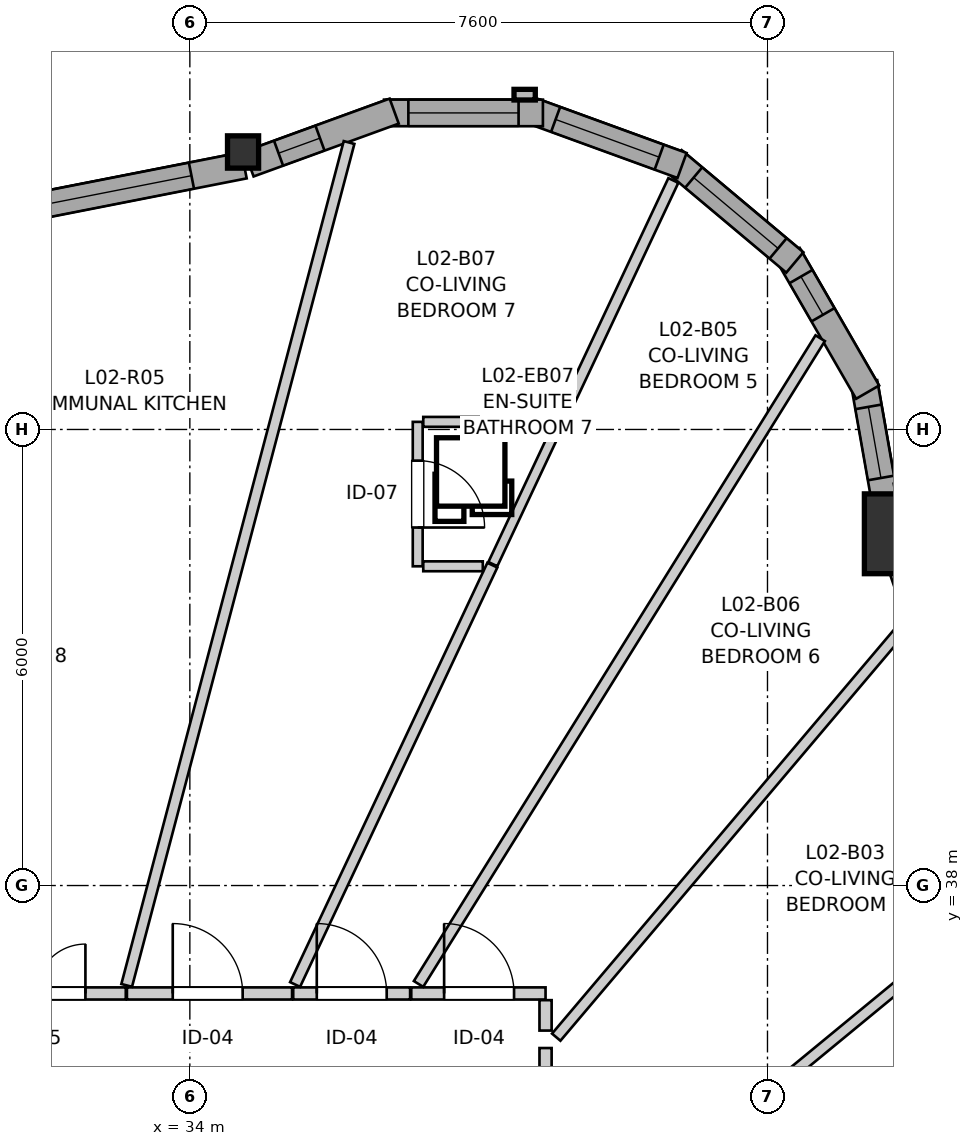
"""IFC4 building model, lengths in metres.
Left out: names, types, materials, properties, quantities, classifications, styles, units other than length and angle.
Written with IfcOpenShell. Run it as: python <this file> out.ifc"""

import sys

from ifc_helpers import new_model, si_unit, direction, frame, frame_2d, origin, origin_2d, place, context, subcontext, project, spatial, rectangle, i_section, extrude, source, transform, mapped, element, fill, save


model = new_model("IFC4")
c1 = context("Model", 3, precision=1e-05, world=origin(), true_north=direction((0.0, 1.0)))
c2 = subcontext(c1, "Body", "Model", "MODEL_VIEW")
j1 = project(units=[si_unit("LENGTHUNIT", "METRE"), si_unit("PLANEANGLEUNIT", "RADIAN")], contexts=[c1])
p1 = place(None, origin())
s1 = spatial("IfcSite", under=j1, at=p1, CompositionType="ELEMENT")
p2 = place(p1, origin())
s2 = spatial("IfcBuilding", under=s1, at=p2, CompositionType="ELEMENT")
p3 = place(p2, frame((0.0, 0.0, 11.0)))
s3 = spatial("IfcBuildingStorey", under=s2, at=p3, CompositionType="ELEMENT", Elevation=11.0)
m1 = source(origin(), c2, "Body", "SweptSolid", [
    extrude(rectangle(XDim=1.05, YDim=1.05, at=origin_2d()), origin(), (0.0, 0.0, 1.0), 2.94),
])
p4 = place(p3, frame((43.4, 42.628, 0.0), z_axis=(0.0, 0.0, 1.0), x_axis=(1.0, 0.0, 0.0)))
e1 = element("IfcColumn", 1, at=p4, inside=s3, PredefinedType="COLUMN", context=c2, shape_type="MappedRepresentation", body=[
    mapped(m1, transform((0.0, 0.0, 0.0), x_axis=(1.0, 0.0, 0.0), y_axis=(0.0, 1.0, 0.0), z_axis=(0.0, 0.0, 1.0), scale=1.0)),
])
m2 = source(origin(), c2, "Body", "SweptSolid", [
    extrude(i_section(OverallWidth=0.409, OverallDepth=0.425, WebThickness=0.03, FlangeThickness=0.048, FilletRadius=0.015, at=origin_2d()), origin(), (0.0, 0.0, 1.0), 2.94),
])
p5 = place(p3, frame((34.7, 47.651, 0.0), z_axis=(0.0, 0.0, 1.0), x_axis=(1.0, 0.0, 0.0)))
e2 = element("IfcColumn", 2, at=p5, inside=s3, PredefinedType="PILASTER", context=c2, shape_type="MappedRepresentation", body=[
    mapped(m2, transform((0.0, 0.0, 0.0), x_axis=(1.0, 0.0, 0.0), y_axis=(0.0, 1.0, 0.0), z_axis=(0.0, 0.0, 1.0), scale=1.0)),
])
p6 = place(p3, frame((44.384, 39.21, 0.0), z_axis=(0.0, 0.0, 1.0), x_axis=(-0.323604561993, 0.946192415663, 0.0)))
e3 = element("IfcWall", 3, at=p6, inside=s3, PredefinedType="SOLIDWALL", context=c2, shape_type="SweptSolid", body=[
    extrude(rectangle(XDim=3.252, YDim=0.35, at=frame_2d((1.626, 0.0))), origin(), (0.0, 0.0, 1.0), 2.42),
])
p7 = place(p6, frame((0.683, 0.0, 0.82)))
e4 = element("IfcOpeningElement", 4, at=p7, cuts=e3, PredefinedType="OPENING", context=c2, shape_type="SweptSolid", body=[
    extrude(rectangle(XDim=1.15, YDim=1.2, at=frame_2d((0.575, 0.6))), frame((0.0, 0.185, 0.0), z_axis=(0.0, -1.0, 0.0), x_axis=(1.0, 0.0, 0.0)), (0.0, 0.0, 1.0), 0.37),
])
p8 = place(p3, frame((43.176, 42.893, 0.0), z_axis=(0.0, 0.0, 1.0), x_axis=(-0.173610462023, 0.984814402553, 0.0)))
e5 = element("IfcWall", 5, at=p8, inside=s3, PredefinedType="SOLIDWALL", context=c2, shape_type="SweptSolid", body=[
    extrude(rectangle(XDim=1.752, YDim=0.35, at=frame_2d((0.876, 0.0))), origin(), (0.0, 0.0, 1.0), 2.42),
])
p9 = place(p8, frame((0.476, 0.0, 0.82)))
e6 = element("IfcOpeningElement", 6, at=p9, cuts=e5, PredefinedType="OPENING", context=c2, shape_type="SweptSolid", body=[
    extrude(rectangle(XDim=0.95, YDim=1.35, at=frame_2d((0.475, 0.675))), frame((0.0, 0.185, 0.0), z_axis=(0.0, -1.0, 0.0), x_axis=(1.0, 0.0, 0.0)), (0.0, 0.0, 1.0), 0.37),
])
p10 = place(p3, frame((42.917, 44.491, 0.0), z_axis=(0.0, 0.0, 1.0), x_axis=(-0.49990781971, 0.866078617559, 0.0)))
e7 = element("IfcWall", 7, at=p10, inside=s3, PredefinedType="SOLIDWALL", context=c2, shape_type="SweptSolid", body=[
    extrude(rectangle(XDim=2.09, YDim=0.35, at=frame_2d((1.045, 0.0))), origin(), (0.0, 0.0, 1.0), 2.42),
])
p11 = place(p10, frame((1.175, 0.0, 0.82)))
e8 = element("IfcOpeningElement", 8, at=p11, cuts=e7, PredefinedType="OPENING", context=c2, shape_type="SweptSolid", body=[
    extrude(rectangle(XDim=0.58, YDim=1.35, at=frame_2d((0.29, 0.675))), frame((0.0, 0.185, 0.0), z_axis=(0.0, -1.0, 0.0), x_axis=(1.0, 0.0, 0.0)), (0.0, 0.0, 1.0), 0.37),
])
p12 = place(p3, frame((41.96, 46.198, 0.0), z_axis=(0.0, 0.0, 1.0), x_axis=(-0.766082082368, 0.642742750308, 0.0)))
e9 = element("IfcWall", 9, at=p12, inside=s3, PredefinedType="SOLIDWALL", context=c2, shape_type="SweptSolid", body=[
    extrude(rectangle(XDim=2.09, YDim=0.35, at=frame_2d((1.045, 0.0))), origin(), (0.0, 0.0, 1.0), 2.42),
])
p13 = place(p12, frame((0.287, 0.0, 0.82)))
e10 = element("IfcOpeningElement", 10, at=p13, cuts=e9, PredefinedType="OPENING", context=c2, shape_type="SweptSolid", body=[
    extrude(rectangle(XDim=1.45, YDim=1.25, at=frame_2d((0.725, 0.625))), frame((0.0, 0.185, 0.0), z_axis=(0.0, -1.0, 0.0), x_axis=(1.0, 0.0, 0.0)), (0.0, 0.0, 1.0), 0.37),
])
p14 = place(p3, frame((40.476, 47.473, 0.0), z_axis=(0.0, 0.0, 1.0), x_axis=(-0.939660353162, 0.342108784886, 0.0)))
e11 = element("IfcWall", 11, at=p14, inside=s3, PredefinedType="SOLIDWALL", context=c2, shape_type="SweptSolid", body=[
    extrude(rectangle(XDim=2.09, YDim=0.35, at=frame_2d((1.045, 0.0))), origin(), (0.0, 0.0, 1.0), 2.42),
])
p15 = place(p14, frame((0.32, 0.0, 0.82)))
e12 = element("IfcOpeningElement", 12, at=p15, cuts=e11, PredefinedType="OPENING", context=c2, shape_type="SweptSolid", body=[
    extrude(rectangle(XDim=1.45, YDim=1.25, at=frame_2d((0.725, 0.625))), frame((0.0, 0.185, 0.0), z_axis=(0.0, -1.0, 0.0), x_axis=(1.0, 0.0, 0.0)), (0.0, 0.0, 1.0), 0.37),
])
p16 = place(p3, frame((38.645, 48.165, 0.0), z_axis=(0.0, 0.0, 1.0), x_axis=(-1.0, 0.0, 0.0)))
e13 = element("IfcWall", 13, at=p16, inside=s3, PredefinedType="SOLIDWALL", context=c2, shape_type="SweptSolid", body=[
    extrude(rectangle(XDim=2.091, YDim=0.35, at=frame_2d((1.045, 0.0))), origin(), (0.0, 0.0, 1.0), 2.42),
])
p17 = place(p16, frame((0.32, 0.0, 0.82)))
e14 = element("IfcOpeningElement", 14, at=p17, cuts=e13, PredefinedType="OPENING", context=c2, shape_type="SweptSolid", body=[
    extrude(rectangle(XDim=1.45, YDim=1.25, at=frame_2d((0.725, 0.625))), frame((0.0, 0.185, 0.0), z_axis=(0.0, -1.0, 0.0), x_axis=(1.0, 0.0, 0.0)), (0.0, 0.0, 1.0), 0.37),
])
p18 = place(p3, frame((36.688, 48.188, 0.0), z_axis=(0.0, 0.0, 1.0), x_axis=(-0.939653047052, -0.342128851701, 0.0)))
e15 = element("IfcWall", 15, at=p18, inside=s3, PredefinedType="SOLIDWALL", context=c2, shape_type="SweptSolid", body=[
    extrude(rectangle(XDim=2.032, YDim=0.35, at=frame_2d((1.016, 0.0))), origin(), (0.0, 0.0, 1.0), 2.42),
])
p19 = place(p18, frame((1.039, 0.0, 0.82)))
e16 = element("IfcOpeningElement", 16, at=p19, cuts=e15, PredefinedType="OPENING", context=c2, shape_type="SweptSolid", body=[
    extrude(rectangle(XDim=0.58, YDim=1.35, at=frame_2d((0.29, 0.675))), frame((0.0, 0.185, 0.0), z_axis=(0.0, -1.0, 0.0), x_axis=(1.0, 0.0, 0.0)), (0.0, 0.0, 1.0), 0.37),
])
p20 = place(p3, frame((34.714, 47.475, 0.0), z_axis=(0.0, 0.0, 1.0), x_axis=(-0.981221268425, -0.192885516282, 0.0)))
e17 = element("IfcWall", 17, at=p20, inside=s3, PredefinedType="SOLIDWALL", context=c2, shape_type="SweptSolid", body=[
    extrude(rectangle(XDim=3.533, YDim=0.35, at=frame_2d((1.766, 0.0))), origin(), (0.0, 0.0, 1.0), 2.42),
])
p21 = place(p20, frame((0.706, 0.0, 0.82)))
e18 = element("IfcOpeningElement", 18, at=p21, cuts=e17, PredefinedType="OPENING", context=c2, shape_type="SweptSolid", body=[
    extrude(rectangle(XDim=2.1, YDim=1.4, at=frame_2d((1.05, 0.7))), frame((0.0, 0.185, 0.0), z_axis=(0.0, -1.0, 0.0), x_axis=(1.0, 0.0, 0.0)), (0.0, 0.0, 1.0), 0.37),
])
p22 = place(p3, frame((38.68, 35.862, 0.0), z_axis=(0.0, 0.0, 1.0), x_axis=(0.0, -1.0, 0.0)))
e19 = element("IfcWall", 19, at=p22, inside=s3, PredefinedType="PARTITIONING", context=c2, shape_type="SweptSolid", body=[
    extrude(rectangle(XDim=3.024, YDim=0.16, at=frame_2d((1.512, 0.0))), origin(), (0.0, 0.0, 1.0), 2.94),
])
p23 = place(p22, frame((1.053, 0.0, 0.0)))
e20 = element("IfcOpeningElement", 20, at=p23, cuts=e19, PredefinedType="OPENING", context=c2, shape_type="SweptSolid", body=[
    extrude(rectangle(XDim=0.92, YDim=2.1, at=frame_2d((0.46, 1.05))), frame((0.0, 0.09, 0.0), z_axis=(0.0, -1.0, 0.0), x_axis=(1.0, 0.0, 0.0)), (0.0, 0.0, 1.0), 0.18),
])
p24 = place(p3, frame((30.841, 36.58, 0.0), z_axis=(0.0, 0.0, 1.0), x_axis=(1.0, 0.0, 0.0)))
e21 = element("IfcWall", 21, at=p24, inside=s3, PredefinedType="PARTITIONING", context=c2, shape_type="SweptSolid", body=[
    extrude(rectangle(XDim=2.316, YDim=0.16, at=frame_2d((1.158, 0.0))), origin(), (0.0, 0.0, 1.0), 2.94),
])
p25 = place(p24, frame((0.485, 0.0, 0.0)))
e22 = element("IfcOpeningElement", 22, at=p25, cuts=e21, PredefinedType="OPENING", context=c2, shape_type="SweptSolid", body=[
    extrude(rectangle(XDim=1.3, YDim=2.1, at=frame_2d((0.65, 1.05))), frame((0.0, 0.09, 0.0), z_axis=(0.0, -1.0, 0.0), x_axis=(1.0, 0.0, 0.0)), (0.0, 0.0, 1.0), 0.18),
])
p26 = place(p3, frame((33.172, 36.58, 0.0), z_axis=(0.0, 0.0, 1.0), x_axis=(1.0, 0.0, 0.0)))
e23 = element("IfcWall", 23, at=p26, inside=s3, PredefinedType="PARTITIONING", context=c2, shape_type="SweptSolid", body=[
    extrude(rectangle(XDim=2.173, YDim=0.16, at=frame_2d((1.086, 0.0))), origin(), (0.0, 0.0, 1.0), 2.94),
])
p27 = place(p26, frame((0.603, 0.0, 0.0)))
e24 = element("IfcOpeningElement", 24, at=p27, cuts=e23, PredefinedType="OPENING", context=c2, shape_type="SweptSolid", body=[
    extrude(rectangle(XDim=0.92, YDim=2.1, at=frame_2d((0.46, 1.05))), frame((0.0, 0.09, 0.0), z_axis=(0.0, -1.0, 0.0), x_axis=(1.0, 0.0, 0.0)), (0.0, 0.0, 1.0), 0.18),
])
p28 = place(p3, frame((36.998, 44.1, 0.0), z_axis=(0.0, 0.0, 1.0), x_axis=(0.0, -1.0, 0.0)))
e25 = element("IfcWall", 25, at=p28, inside=s3, PredefinedType="PARTITIONING", context=c2, shape_type="SweptSolid", body=[
    extrude(rectangle(XDim=1.9, YDim=0.13, at=frame_2d((0.95, 0.0))), origin(), (0.0, 0.0, 1.0), 2.94),
])
p29 = place(p28, frame((0.51, 0.0, 0.0)))
e26 = element("IfcOpeningElement", 26, at=p29, cuts=e25, PredefinedType="OPENING", context=c2, shape_type="SweptSolid", body=[
    extrude(rectangle(XDim=0.88, YDim=2.05, at=frame_2d((0.44, 1.025))), frame((0.0, 0.075, 0.0), z_axis=(0.0, -1.0, 0.0), x_axis=(1.0, 0.0, 0.0)), (0.0, 0.0, 1.0), 0.15),
])
p30 = place(p3, frame((36.913, 36.58, 0.0), z_axis=(0.0, 0.0, 1.0), x_axis=(1.0, 0.0, 0.0)))
e27 = element("IfcWall", 27, at=p30, inside=s3, PredefinedType="PARTITIONING", context=c2, shape_type="SweptSolid", body=[
    extrude(rectangle(XDim=1.767, YDim=0.16, at=frame_2d((0.883, 0.0))), origin(), (0.0, 0.0, 1.0), 2.94),
])
p31 = place(p30, frame((0.433, 0.0, 0.0)))
e28 = element("IfcOpeningElement", 28, at=p31, cuts=e27, PredefinedType="OPENING", context=c2, shape_type="SweptSolid", body=[
    extrude(rectangle(XDim=0.92, YDim=2.1, at=frame_2d((0.46, 1.05))), frame((0.0, 0.09, 0.0), z_axis=(0.0, -1.0, 0.0), x_axis=(1.0, 0.0, 0.0)), (0.0, 0.0, 1.0), 0.18),
])
p32 = place(p3, frame((35.36, 36.58, 0.0), z_axis=(0.0, 0.0, 1.0), x_axis=(1.0, 0.0, 0.0)))
e29 = element("IfcWall", 29, at=p32, inside=s3, PredefinedType="PARTITIONING", context=c2, shape_type="SweptSolid", body=[
    extrude(rectangle(XDim=1.538, YDim=0.16, at=frame_2d((0.769, 0.0))), origin(), (0.0, 0.0, 1.0), 2.94),
])
p33 = place(p32, frame((0.31, 0.0, 0.0)))
e30 = element("IfcOpeningElement", 30, at=p33, cuts=e29, PredefinedType="OPENING", context=c2, shape_type="SweptSolid", body=[
    extrude(rectangle(XDim=0.92, YDim=2.1, at=frame_2d((0.46, 1.05))), frame((0.0, 0.09, 0.0), z_axis=(0.0, -1.0, 0.0), x_axis=(1.0, 0.0, 0.0)), (0.0, 0.0, 1.0), 0.18),
])
p34 = place(p3, frame((33.169, 36.686, 0.0), z_axis=(0.0, 0.0, 1.0), x_axis=(0.255112522394, 0.966911371801, 0.0)))
e31 = element("IfcWall", 31, at=p34, inside=s3, PredefinedType="PARTITIONING", context=c2, shape_type="SweptSolid", body=[
    extrude(rectangle(XDim=11.469, YDim=0.145, at=frame_2d((5.734, 0.0))), origin(), (0.0, 0.0, 1.0), 2.94),
])
p35 = place(p3, frame((37.009, 36.705, 0.0), z_axis=(0.0, 0.0, 1.0), x_axis=(0.528183829193, 0.849130050451, 0.0)))
e32 = element("IfcWall", 32, at=p35, inside=s3, PredefinedType="PARTITIONING", context=c2, shape_type="SweptSolid", body=[
    extrude(rectangle(XDim=10.005, YDim=0.145, at=frame_2d((5.003, 0.0))), origin(), (0.0, 0.0, 1.0), 2.94),
])
p36 = place(p3, frame((38.812, 32.967, 0.0), z_axis=(0.0, 0.0, 1.0), x_axis=(0.772048037558, 0.635564180633, 0.0)))
e33 = element("IfcWall", 33, at=p36, inside=s3, PredefinedType="PARTITIONING", context=c2, shape_type="SweptSolid", body=[
    extrude(rectangle(XDim=7.477, YDim=0.145, at=frame_2d((3.739, 0.0))), origin(), (0.0, 0.0, 1.0), 2.94),
])
p37 = place(p3, frame((38.821, 36.005, 0.0), z_axis=(0.0, 0.0, 1.0), x_axis=(0.646174151972, 0.76318999294, 0.0)))
e34 = element("IfcWall", 34, at=p37, inside=s3, PredefinedType="PARTITIONING", context=c2, shape_type="SweptSolid", body=[
    extrude(rectangle(XDim=7.125, YDim=0.145, at=frame_2d((3.562, 0.0))), origin(), (0.0, 0.0, 1.0), 2.94),
])
p38 = place(p3, frame((35.385, 36.698, 0.0), z_axis=(0.0, 0.0, 1.0), x_axis=(0.425687116038, 0.904870421242, 0.0)))
e35 = element("IfcWall", 35, at=p38, inside=s3, PredefinedType="PARTITIONING", context=c2, shape_type="SweptSolid", body=[
    extrude(rectangle(XDim=6.097, YDim=0.145, at=frame_2d((3.049, 0.0))), origin(), (0.0, 0.0, 1.0), 2.94),
])
p39 = place(p3, frame((38.783, 43.921, 0.0), z_axis=(0.0, 0.0, 1.0), x_axis=(0.425698730146, 0.904864957412, 0.0)))
e36 = element("IfcWall", 36, at=p39, inside=s3, PredefinedType="PARTITIONING", context=c2, shape_type="SweptSolid", body=[
    extrude(rectangle(XDim=3.708, YDim=0.145, at=frame_2d((1.854, 0.0))), origin(), (0.0, 0.0, 1.0), 2.94),
])
p40 = place(p3, frame((37.987, 42.229, 0.0), z_axis=(0.0, 0.0, 1.0), x_axis=(0.425771690569, 0.904830629184, 0.0)))
e37 = element("IfcWall", 37, at=p40, inside=s3, PredefinedType="PARTITIONING", context=c2, shape_type="SweptSolid", body=[
    extrude(rectangle(XDim=1.855, YDim=0.13, at=frame_2d((0.928, 0.0))), origin(), (0.0, 0.0, 1.0), 2.94),
])
p41 = place(p3, frame((37.071, 44.1, 0.0), z_axis=(0.0, 0.0, 1.0), x_axis=(1.0, 0.0, 0.0)))
e38 = element("IfcWall", 38, at=p41, inside=s3, PredefinedType="PARTITIONING", context=c2, shape_type="SweptSolid", body=[
    extrude(rectangle(XDim=1.608, YDim=0.13, at=frame_2d((0.804, 0.0))), origin(), (0.0, 0.0, 1.0), 2.94),
])
p42 = place(p3, frame((37.071, 42.2, 0.0), z_axis=(0.0, 0.0, 1.0), x_axis=(1.0, 0.0, 0.0)))
e39 = element("IfcWall", 39, at=p42, inside=s3, PredefinedType="PARTITIONING", context=c2, shape_type="SweptSolid", body=[
    extrude(rectangle(XDim=0.783, YDim=0.13, at=frame_2d((0.392, 0.0))), origin(), (0.0, 0.0, 1.0), 2.94),
])
p43 = place(p3, frame((38.68, 36.092, 0.0), z_axis=(0.0, 0.0, 1.0), x_axis=(0.0, 1.0, 0.0)))
e40 = element("IfcWall", 40, at=p43, inside=s3, PredefinedType="PARTITIONING", context=c2, shape_type="SweptSolid", body=[
    extrude(rectangle(XDim=0.4, YDim=0.16, at=frame_2d((0.2, 0.0))), origin(), (0.0, 0.0, 1.0), 2.94),
])
m3 = source(origin(), c2, "Body", "SweptSolid", [
    extrude(rectangle(XDim=0.95, YDim=1.35, at=frame_2d((0.475, 0.675))), frame((0.0, 0.03, 0.0), z_axis=(0.0, -1.0, 0.0), x_axis=(1.0, 0.0, 0.0)), (0.0, 0.0, 1.0), 0.06),
])
p44 = place(p9, origin())
e41 = element("IfcWindow", 41, at=p44, inside=s3, PartitioningType="SINGLE_PANEL", PredefinedType="WINDOW", context=c2, shape_type="MappedRepresentation", body=[
    mapped(m3, transform((0.0, 0.0, 0.0), x_axis=(1.0, 0.0, 0.0), y_axis=(0.0, 1.0, 0.0), z_axis=(0.0, 0.0, 1.0), scale=1.0)),
])
fill(e6, e41)
m4 = source(origin(), c2, "Body", "SweptSolid", [
    extrude(rectangle(XDim=0.58, YDim=1.35, at=frame_2d((0.29, 0.675))), frame((0.0, 0.03, 0.0), z_axis=(0.0, -1.0, 0.0), x_axis=(1.0, 0.0, 0.0)), (0.0, 0.0, 1.0), 0.06),
])
p45 = place(p11, origin())
e42 = element("IfcWindow", 42, at=p45, inside=s3, PartitioningType="SINGLE_PANEL", PredefinedType="WINDOW", context=c2, shape_type="MappedRepresentation", body=[
    mapped(m4, transform((0.0, 0.0, 0.0), x_axis=(1.0, 0.0, 0.0), y_axis=(0.0, 1.0, 0.0), z_axis=(0.0, 0.0, 1.0), scale=1.0)),
])
fill(e8, e42)
m5 = source(origin(), c2, "Body", "SweptSolid", [
    extrude(rectangle(XDim=1.45, YDim=1.25, at=frame_2d((0.725, 0.625))), frame((0.0, 0.03, 0.0), z_axis=(0.0, -1.0, 0.0), x_axis=(1.0, 0.0, 0.0)), (0.0, 0.0, 1.0), 0.06),
])
p46 = place(p13, origin())
e43 = element("IfcWindow", 43, at=p46, inside=s3, PartitioningType="SINGLE_PANEL", PredefinedType="WINDOW", context=c2, shape_type="MappedRepresentation", body=[
    mapped(m5, transform((0.0, 0.0, 0.0), x_axis=(1.0, 0.0, 0.0), y_axis=(0.0, 1.0, 0.0), z_axis=(0.0, 0.0, 1.0), scale=1.0)),
])
fill(e10, e43)
p47 = place(p15, origin())
e44 = element("IfcWindow", 44, at=p47, inside=s3, PartitioningType="SINGLE_PANEL", PredefinedType="WINDOW", context=c2, shape_type="MappedRepresentation", body=[
    mapped(m5, transform((0.0, 0.0, 0.0), x_axis=(1.0, 0.0, 0.0), y_axis=(0.0, 1.0, 0.0), z_axis=(0.0, 0.0, 1.0), scale=1.0)),
])
fill(e12, e44)
p48 = place(p17, origin())
e45 = element("IfcWindow", 45, at=p48, inside=s3, PartitioningType="SINGLE_PANEL", PredefinedType="WINDOW", context=c2, shape_type="MappedRepresentation", body=[
    mapped(m5, transform((0.0, 0.0, 0.0), x_axis=(1.0, 0.0, 0.0), y_axis=(0.0, 1.0, 0.0), z_axis=(0.0, 0.0, 1.0), scale=1.0)),
])
fill(e14, e45)
p49 = place(p19, origin())
e46 = element("IfcWindow", 46, at=p49, inside=s3, PartitioningType="SINGLE_PANEL", PredefinedType="WINDOW", context=c2, shape_type="MappedRepresentation", body=[
    mapped(m4, transform((0.0, 0.0, 0.0), x_axis=(1.0, 0.0, 0.0), y_axis=(0.0, 1.0, 0.0), z_axis=(0.0, 0.0, 1.0), scale=1.0)),
])
fill(e16, e46)
m6 = source(origin(), c2, "Body", "SweptSolid", [
    extrude(rectangle(XDim=2.1, YDim=1.4, at=frame_2d((1.05, 0.7))), frame((0.0, 0.03, 0.0), z_axis=(0.0, -1.0, 0.0), x_axis=(1.0, 0.0, 0.0)), (0.0, 0.0, 1.0), 0.06),
])
p50 = place(p21, origin())
e47 = element("IfcWindow", 47, at=p50, inside=s3, PartitioningType="SINGLE_PANEL", PredefinedType="WINDOW", context=c2, shape_type="MappedRepresentation", body=[
    mapped(m6, transform((0.0, 0.0, 0.0), x_axis=(1.0, 0.0, 0.0), y_axis=(0.0, 1.0, 0.0), z_axis=(0.0, 0.0, 1.0), scale=1.0)),
])
fill(e18, e47)
m7 = source(origin(), c2, "Body", "SweptSolid", [
    extrude(rectangle(XDim=1.3, YDim=2.1, at=frame_2d((0.65, 1.05))), frame((0.0, 0.025, 0.0), z_axis=(0.0, -1.0, 0.0), x_axis=(1.0, 0.0, 0.0)), (0.0, 0.0, 1.0), 0.05),
])
p51 = place(p25, origin())
e48 = element("IfcDoor", 48, at=p51, inside=s3, OperationType="DOUBLE_DOOR_SINGLE_SWING", PredefinedType="DOOR", context=c2, shape_type="MappedRepresentation", body=[
    mapped(m7, transform((0.0, 0.0, 0.0), x_axis=(1.0, 0.0, 0.0), y_axis=(0.0, 1.0, 0.0), z_axis=(0.0, 0.0, 1.0), scale=1.0)),
])
fill(e22, e48)
m8 = source(origin(), c2, "Body", "SweptSolid", [
    extrude(rectangle(XDim=0.92, YDim=2.1, at=frame_2d((0.46, 1.05))), frame((0.0, 0.025, 0.0), z_axis=(0.0, -1.0, 0.0), x_axis=(1.0, 0.0, 0.0)), (0.0, 0.0, 1.0), 0.05),
])
p52 = place(p27, origin())
e49 = element("IfcDoor", 49, at=p52, inside=s3, OperationType="SINGLE_SWING_LEFT", PredefinedType="DOOR", context=c2, shape_type="MappedRepresentation", body=[
    mapped(m8, transform((0.0, 0.0, 0.0), x_axis=(1.0, 0.0, 0.0), y_axis=(0.0, 1.0, 0.0), z_axis=(0.0, 0.0, 1.0), scale=1.0)),
])
fill(e24, e49)
m9 = source(origin(), c2, "Body", "SweptSolid", [
    extrude(rectangle(XDim=0.88, YDim=2.05, at=frame_2d((0.44, 1.025))), frame((0.0, 0.025, 0.0), z_axis=(0.0, -1.0, 0.0), x_axis=(1.0, 0.0, 0.0)), (0.0, 0.0, 1.0), 0.05),
])
p53 = place(p29, origin())
e50 = element("IfcDoor", 50, at=p53, inside=s3, OperationType="SINGLE_SWING_RIGHT", PredefinedType="DOOR", context=c2, shape_type="MappedRepresentation", body=[
    mapped(m9, transform((0.0, 0.0, 0.0), x_axis=(1.0, 0.0, 0.0), y_axis=(0.0, 1.0, 0.0), z_axis=(0.0, 0.0, 1.0), scale=1.0)),
])
fill(e26, e50)
p54 = place(p31, origin())
e51 = element("IfcDoor", 51, at=p54, inside=s3, OperationType="SINGLE_SWING_LEFT", PredefinedType="DOOR", context=c2, shape_type="MappedRepresentation", body=[
    mapped(m8, transform((0.0, 0.0, 0.0), x_axis=(1.0, 0.0, 0.0), y_axis=(0.0, 1.0, 0.0), z_axis=(0.0, 0.0, 1.0), scale=1.0)),
])
fill(e28, e51)
p55 = place(p33, origin())
e52 = element("IfcDoor", 52, at=p55, inside=s3, OperationType="SINGLE_SWING_LEFT", PredefinedType="DOOR", context=c2, shape_type="MappedRepresentation", body=[
    mapped(m8, transform((0.0, 0.0, 0.0), x_axis=(1.0, 0.0, 0.0), y_axis=(0.0, 1.0, 0.0), z_axis=(0.0, 0.0, 1.0), scale=1.0)),
])
fill(e30, e52)
save(model, sys.argv[1])
